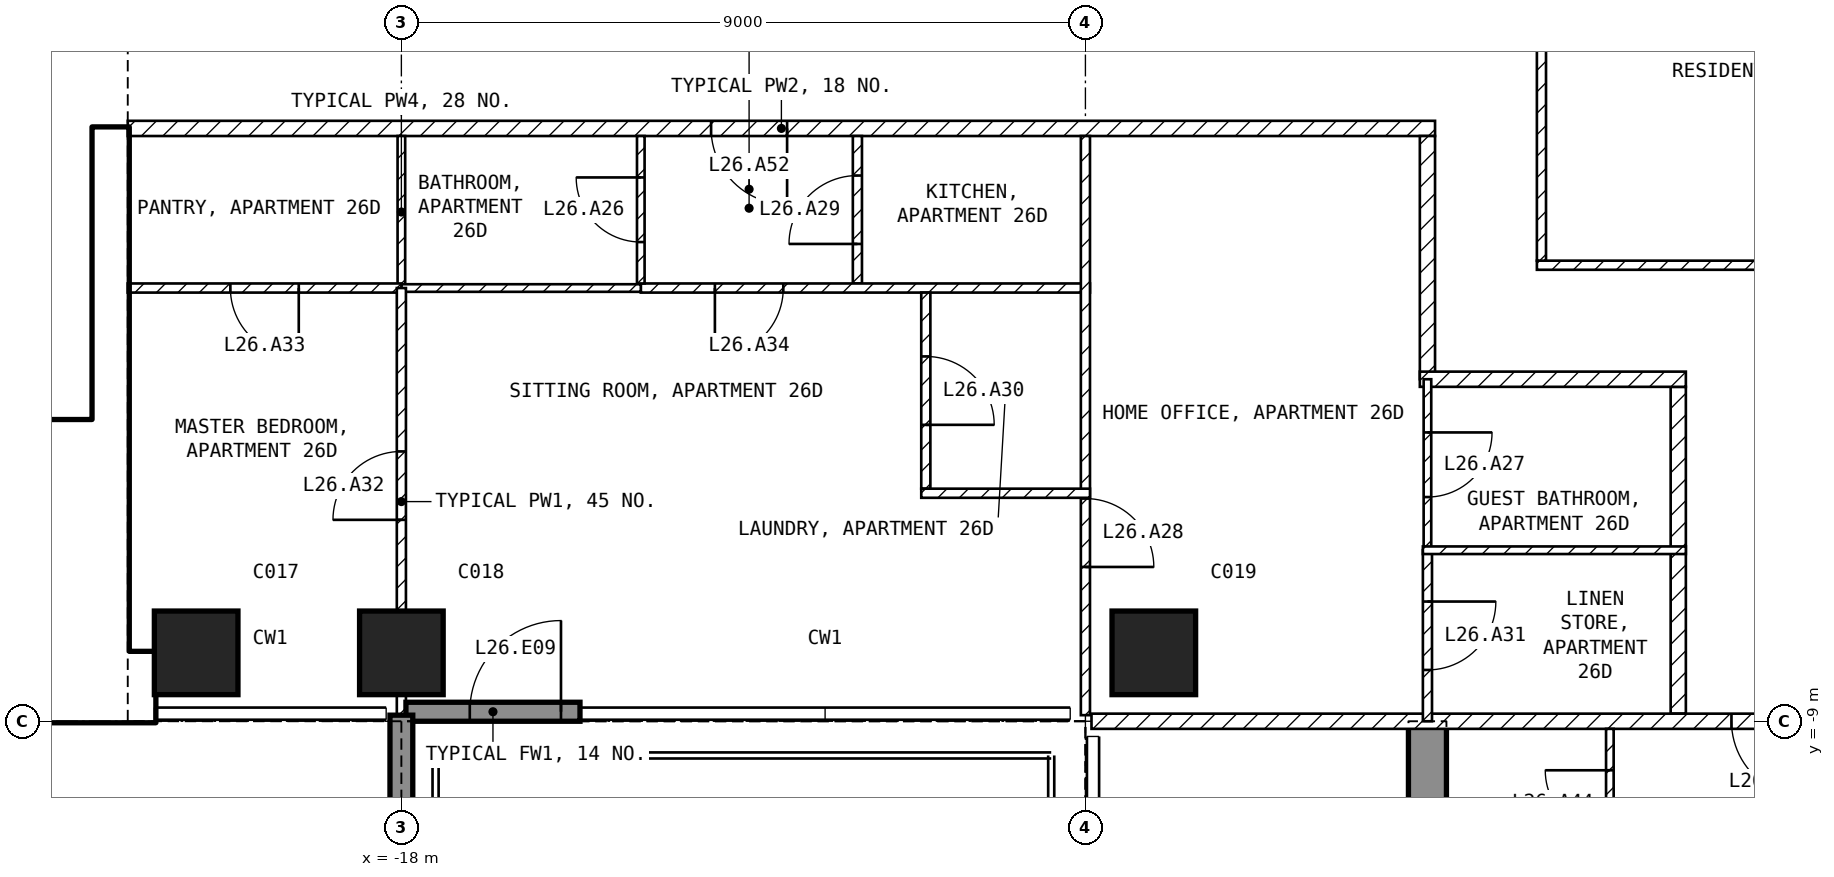
"""IFC4 building model, lengths in metres.
Left out: names, types, materials, properties, quantities, classifications, styles, units other than length and angle.
Written with IfcOpenShell. Run it as: python <this file> out.ifc"""

import sys

from ifc_helpers import new_model, si_unit, direction, frame, frame_2d, origin, origin_2d, place, context, subcontext, project, spatial, polyline, rectangle, outline, extrude, element, fill, save


model = new_model("IFC4")
c1 = context("Model", 3, precision=1e-05, world=origin(), true_north=direction((0.0, 1.0)))
c2 = subcontext(c1, "Body", "Model", "MODEL_VIEW")
j1 = project(units=[si_unit("LENGTHUNIT", "METRE"), si_unit("PLANEANGLEUNIT", "RADIAN")], contexts=[c1])
p1 = place(None, origin())
s1 = spatial("IfcSite", under=j1, at=p1, CompositionType="ELEMENT")
p2 = place(p1, origin())
s2 = spatial("IfcBuilding", under=s1, at=p2, CompositionType="ELEMENT")
p3 = place(p2, frame((0.0, 0.0, 112.9)))
s3 = spatial("IfcBuildingStorey", under=s2, at=p3, CompositionType="ELEMENT", Elevation=112.9)
for number, where, z_axis, x_axis in (
    (1, (-20.7, -8.1, -0.25), (0.0, 0.0, 1.0), (1.0, 0.0, 0.0)),
    (2, (-18.0, -8.1, -0.25), (0.0, 0.0, 1.0), (1.0, 0.0, 0.0)),
    (3, (-8.1, -8.1, -0.25), (0.0, 0.0, 1.0), (1.0, 0.0, 0.0)),
):
    element("IfcColumn", number, at=place(p3, frame(where, z_axis=z_axis, x_axis=x_axis)), inside=s3, PredefinedType="COLUMN", context=c2, shape_type="SweptSolid", body=[
        extrude(rectangle(XDim=1.1, YDim=1.1, at=origin_2d()), origin(), (0.0, 0.0, 1.0), 3.5),
    ])
p4 = place(p3, frame((-4.75, -20.15, -0.25), z_axis=(1.0, 0.0, 0.0), x_axis=(0.0, 1.0, 0.0)))
e4 = element("IfcWall", 4, at=p4, inside=s3, PredefinedType="SHEAR", context=c2, shape_type="SweptSolid", body=[
    extrude(outline(polyline([(0.0, 0.0), (6.65, 0.0), (6.65, 2.65), (9.05, 2.65), (9.05, 0.0), (11.15, 0.0), (11.15, 3.5), (0.0, 3.5), (0.0, 0.0)])), origin(), (0.0, 0.0, 1.0), 0.5),
])
p5 = place(p3, frame((-17.94, -8.875, 0.0), z_axis=(0.0, 0.0, 1.0), x_axis=(1.0, 0.0, 0.0)))
e5 = element("IfcWall", 5, at=p5, inside=s3, PredefinedType="SOLIDWALL", context=c2, shape_type="SweptSolid", body=[
    extrude(rectangle(XDim=2.29, YDim=0.25, at=frame_2d((1.145, 0.0))), origin(), (0.0, 0.0, 1.0), 3.25),
])
p6 = place(p5, frame((0.84, 0.0, 0.0)))
e6 = element("IfcOpeningElement", 6, at=p6, cuts=e5, PredefinedType="OPENING", context=c2, shape_type="SweptSolid", body=[
    extrude(rectangle(XDim=1.2, YDim=2.4, at=frame_2d((0.6, 1.2))), frame((0.0, 0.135, 0.0), z_axis=(0.0, -1.0, 0.0), x_axis=(1.0, 0.0, 0.0)), (0.0, 0.0, 1.0), 0.27),
])
p7 = place(p3, frame((-18.0, -8.92, 0.0), z_axis=(0.0, 0.0, 1.0), x_axis=(0.0, -1.0, 0.0)))
e7 = element("IfcWall", 7, at=p7, inside=s3, PredefinedType="SOLIDWALL", context=c2, shape_type="SweptSolid", body=[
    extrude(rectangle(XDim=2.82, YDim=0.3, at=frame_2d((1.41, 0.0))), origin(), (0.0, 0.0, 1.0), 3.25),
])
p8 = place(p3, frame((-30.2, -8.55, 0.0), z_axis=(0.0, 0.0, 1.0), x_axis=(1.0, 0.0, 0.0)))
e8 = element("IfcWall", 8, at=p8, inside=s3, PredefinedType="SHEAR", context=c2, shape_type="SweptSolid", body=[
    extrude(rectangle(XDim=8.95, YDim=0.9, at=frame_2d((4.475, 0.0))), origin(), (0.0, 0.0, 1.0), 3.25),
])
p9 = place(p3, frame((-21.825, -8.1, 0.0), z_axis=(0.0, 0.0, 1.0), x_axis=(0.0, 1.0, 0.0)))
e9 = element("IfcWall", 9, at=p9, inside=s3, PredefinedType="SHEAR", context=c2, shape_type="SweptSolid", body=[
    extrude(rectangle(XDim=6.9, YDim=0.45, at=frame_2d((3.45, 0.0))), origin(), (0.0, 0.0, 1.0), 3.25),
])
p10 = place(p3, frame((-28.35, -5.15, 0.0), z_axis=(0.0, 0.0, 1.0), x_axis=(1.0, 0.0, 0.0)))
e10 = element("IfcWall", 10, at=p10, inside=s3, PredefinedType="SOLIDWALL", context=c2, shape_type="SweptSolid", body=[
    extrude(rectangle(XDim=6.3, YDim=0.2, at=frame_2d((3.15, 0.0))), origin(), (0.0, 0.0, 1.0), 3.25),
])
p11 = place(p10, frame((5.1, 0.0, 0.0)))
e11 = element("IfcOpeningElement", 11, at=p11, cuts=e10, PredefinedType="OPENING", context=c2, shape_type="SweptSolid", body=[
    extrude(rectangle(XDim=1.0, YDim=2.1, at=frame_2d((0.5, 1.05))), frame((0.0, 0.11, 0.0), z_axis=(0.0, -1.0, 0.0), x_axis=(1.0, 0.0, 0.0)), (0.0, 0.0, 1.0), 0.22),
])
p12 = place(p3, frame((-3.06, -3.0, 0.0), z_axis=(0.0, 0.0, 1.0), x_axis=(1.0, 0.0, 0.0)))
e12 = element("IfcWall", 12, at=p12, inside=s3, PredefinedType="PARTITIONING", context=c2, shape_type="SweptSolid", body=[
    extrude(rectangle(XDim=6.12, YDim=0.12, at=frame_2d((3.06, 0.0))), origin(), (0.0, 0.0, 1.0), 3.25),
])
p13 = place(p3, frame((-3.0, 2.94, 0.0), z_axis=(0.0, 0.0, 1.0), x_axis=(0.0, -1.0, 0.0)))
e13 = element("IfcWall", 13, at=p13, inside=s3, PredefinedType="PARTITIONING", context=c2, shape_type="SweptSolid", body=[
    extrude(rectangle(XDim=5.88, YDim=0.12, at=frame_2d((2.94, 0.0))), origin(), (0.0, 0.0, 1.0), 3.25),
])
p14 = place(p3, frame((-4.4, -1.2, 0.0), z_axis=(0.0, 0.0, 1.0), x_axis=(-1.0, 0.0, 0.0)))
e14 = element("IfcWall", 14, at=p14, inside=s3, PredefinedType="PARTITIONING", context=c2, shape_type="SweptSolid", body=[
    extrude(rectangle(XDim=17.2, YDim=0.2, at=frame_2d((8.6, 0.0))), origin(), (0.0, 0.0, 1.0), 3.25),
])
p15 = place(p14, frame((8.525, 0.0, 0.0)))
e15 = element("IfcOpeningElement", 15, at=p15, cuts=e14, PredefinedType="OPENING", context=c2, shape_type="SweptSolid", body=[
    extrude(rectangle(XDim=1.0, YDim=2.1, at=frame_2d((0.5, 1.05))), frame((0.0, 0.11, 0.0), z_axis=(0.0, -1.0, 0.0), x_axis=(1.0, 0.0, 0.0)), (0.0, 0.0, 1.0), 0.22),
])
p16 = place(p3, frame((-4.5, -4.5, 0.0), z_axis=(0.0, 0.0, 1.0), x_axis=(0.0, 1.0, 0.0)))
e16 = element("IfcWall", 16, at=p16, inside=s3, PredefinedType="PARTITIONING", context=c2, shape_type="SweptSolid", body=[
    extrude(rectangle(XDim=3.2, YDim=0.2, at=frame_2d((1.6, 0.0))), origin(), (0.0, 0.0, 1.0), 3.25),
])
p17 = place(p3, frame((-1.2, -8.9, 0.0), z_axis=(0.0, 0.0, 1.0), x_axis=(0.0, 1.0, 0.0)))
e17 = element("IfcWall", 17, at=p17, inside=s3, PredefinedType="PARTITIONING", context=c2, shape_type="SweptSolid", body=[
    extrude(rectangle(XDim=4.3, YDim=0.2, at=frame_2d((2.15, 0.0))), origin(), (0.0, 0.0, 1.0), 3.25),
])
p18 = place(p3, frame((-1.1, -4.5, 0.0), z_axis=(0.0, 0.0, 1.0), x_axis=(-1.0, 0.0, 0.0)))
e18 = element("IfcWall", 18, at=p18, inside=s3, PredefinedType="PARTITIONING", context=c2, shape_type="SweptSolid", body=[
    extrude(rectangle(XDim=3.5, YDim=0.2, at=frame_2d((1.75, 0.0))), origin(), (0.0, 0.0, 1.0), 3.25),
])
p19 = place(p3, frame((8.92, -9.0, 0.0), z_axis=(0.0, 0.0, 1.0), x_axis=(-1.0, 0.0, 0.0)))
e19 = element("IfcWall", 19, at=p19, inside=s3, PredefinedType="PARTITIONING", context=c2, shape_type="SweptSolid", body=[
    extrude(rectangle(XDim=17.84, YDim=0.2, at=frame_2d((8.92, 0.0))), origin(), (0.0, 0.0, 1.0), 3.25),
])
p20 = place(p19, frame((8.42, 0.0, 0.0)))
e20 = element("IfcOpeningElement", 20, at=p20, cuts=e19, PredefinedType="OPENING", context=c2, shape_type="SweptSolid", body=[
    extrude(rectangle(XDim=1.0, YDim=2.1, at=frame_2d((0.5, 1.05))), frame((0.0, 0.11, 0.0), z_axis=(0.0, -1.0, 0.0), x_axis=(1.0, 0.0, 0.0)), (0.0, 0.0, 1.0), 0.22),
])
p21 = place(p3, frame((-12.0, -3.24, 0.0), z_axis=(0.0, 0.0, 1.0), x_axis=(0.0, 1.0, 0.0)))
e21 = element("IfcWall", 21, at=p21, inside=s3, PredefinedType="PARTITIONING", context=c2, shape_type="SweptSolid", body=[
    extrude(rectangle(XDim=1.94, YDim=0.12, at=frame_2d((0.97, 0.0))), origin(), (0.0, 0.0, 1.0), 3.25),
])
p22 = place(p21, frame((0.52, 0.0, 0.0)))
e22 = element("IfcOpeningElement", 22, at=p22, cuts=e21, PredefinedType="OPENING", context=c2, shape_type="SweptSolid", body=[
    extrude(rectangle(XDim=0.9, YDim=2.1, at=frame_2d((0.45, 1.05))), frame((0.0, 0.07, 0.0), z_axis=(0.0, -1.0, 0.0), x_axis=(1.0, 0.0, 0.0)), (0.0, 0.0, 1.0), 0.14),
])
p23 = place(p3, frame((-8.94, -3.3, 0.0), z_axis=(0.0, 0.0, 1.0), x_axis=(-1.0, 0.0, 0.0)))
e23 = element("IfcWall", 23, at=p23, inside=s3, PredefinedType="PARTITIONING", context=c2, shape_type="SweptSolid", body=[
    extrude(rectangle(XDim=5.91, YDim=0.12, at=frame_2d((2.955, 0.0))), origin(), (0.0, 0.0, 1.0), 3.25),
])
p24 = place(p23, frame((4.035, 0.0, 0.0)))
e24 = element("IfcOpeningElement", 24, at=p24, cuts=e23, PredefinedType="OPENING", context=c2, shape_type="SweptSolid", body=[
    extrude(rectangle(XDim=0.9, YDim=2.1, at=frame_2d((0.45, 1.05))), frame((0.0, 0.07, 0.0), z_axis=(0.0, -1.0, 0.0), x_axis=(1.0, 0.0, 0.0)), (0.0, 0.0, 1.0), 0.14),
])
p25 = place(p3, frame((-9.0, -1.3, 0.0), z_axis=(0.0, 0.0, 1.0), x_axis=(0.0, -1.0, 0.0)))
e25 = element("IfcWall", 25, at=p25, inside=s3, PredefinedType="PARTITIONING", context=c2, shape_type="SweptSolid", body=[
    extrude(rectangle(XDim=7.62, YDim=0.12, at=frame_2d((3.81, 0.0))), origin(), (0.0, 0.0, 1.0), 3.25),
])
p26 = place(p25, frame((4.77, 0.0, 0.0)))
e26 = element("IfcOpeningElement", 26, at=p26, cuts=e25, PredefinedType="OPENING", context=c2, shape_type="SweptSolid", body=[
    extrude(rectangle(XDim=0.9, YDim=2.1, at=frame_2d((0.45, 1.05))), frame((0.0, 0.07, 0.0), z_axis=(0.0, -1.0, 0.0), x_axis=(1.0, 0.0, 0.0)), (0.0, 0.0, 1.0), 0.14),
])
p27 = place(p3, frame((-14.85, -3.24, 0.0), z_axis=(0.0, 0.0, 1.0), x_axis=(0.0, 1.0, 0.0)))
e27 = element("IfcWall", 27, at=p27, inside=s3, PredefinedType="PARTITIONING", context=c2, shape_type="SweptSolid", body=[
    extrude(rectangle(XDim=1.94, YDim=0.1, at=frame_2d((0.97, 0.0))), origin(), (0.0, 0.0, 1.0), 3.25),
])
p28 = place(p27, frame((0.545, 0.0, 0.0)))
e28 = element("IfcOpeningElement", 28, at=p28, cuts=e27, PredefinedType="OPENING", context=c2, shape_type="SweptSolid", body=[
    extrude(rectangle(XDim=0.85, YDim=2.1, at=frame_2d((0.425, 1.05))), frame((0.0, 0.06, 0.0), z_axis=(0.0, -1.0, 0.0), x_axis=(1.0, 0.0, 0.0)), (0.0, 0.0, 1.0), 0.12),
])
p29 = place(p3, frame((-18.0, -3.3, 0.0), z_axis=(0.0, 0.0, 1.0), x_axis=(0.0, 1.0, 0.0)))
e29 = element("IfcWall", 29, at=p29, inside=s3, PredefinedType="PARTITIONING", context=c2, shape_type="SweptSolid", body=[
    extrude(rectangle(XDim=2.0, YDim=0.1, at=frame_2d((1.0, 0.0))), origin(), (0.0, 0.0, 1.0), 2.414),
])
p30 = place(p3, frame((-14.85, -3.3, 0.0), z_axis=(0.0, 0.0, 1.0), x_axis=(-1.0, 0.0, 0.0)))
e30 = element("IfcWall", 30, at=p30, inside=s3, PredefinedType="PARTITIONING", context=c2, shape_type="SweptSolid", body=[
    extrude(rectangle(XDim=3.15, YDim=0.1, at=frame_2d((1.575, 0.0))), origin(), (0.0, 0.0, 1.0), 3.25),
])
p31 = place(p3, frame((-18.0, -3.3, 0.0), z_axis=(0.0, 0.0, 1.0), x_axis=(-1.0, 0.0, 0.0)))
e31 = element("IfcWall", 31, at=p31, inside=s3, PredefinedType="PARTITIONING", context=c2, shape_type="SweptSolid", body=[
    extrude(rectangle(XDim=3.6, YDim=0.12, at=frame_2d((1.8, 0.0))), origin(), (0.0, 0.0, 1.0), 3.25),
])
p32 = place(p31, frame((1.35, 0.0, 0.0)))
e32 = element("IfcOpeningElement", 32, at=p32, cuts=e31, PredefinedType="OPENING", context=c2, shape_type="SweptSolid", body=[
    extrude(rectangle(XDim=0.9, YDim=2.1, at=frame_2d((0.45, 1.05))), frame((0.0, 0.07, 0.0), z_axis=(0.0, -1.0, 0.0), x_axis=(1.0, 0.0, 0.0)), (0.0, 0.0, 1.0), 0.14),
])
p33 = place(p3, frame((-11.1, -3.36, 0.0), z_axis=(0.0, 0.0, 1.0), x_axis=(0.0, -1.0, 0.0)))
e33 = element("IfcWall", 33, at=p33, inside=s3, PredefinedType="PARTITIONING", context=c2, shape_type="SweptSolid", body=[
    extrude(rectangle(XDim=2.58, YDim=0.12, at=frame_2d((1.29, 0.0))), origin(), (0.0, 0.0, 1.0), 3.25),
])
p34 = place(p33, frame((0.84, 0.0, 0.0)))
e34 = element("IfcOpeningElement", 34, at=p34, cuts=e33, PredefinedType="OPENING", context=c2, shape_type="SweptSolid", body=[
    extrude(rectangle(XDim=0.9, YDim=2.1, at=frame_2d((0.45, 1.05))), frame((0.0, 0.07, 0.0), z_axis=(0.0, -1.0, 0.0), x_axis=(1.0, 0.0, 0.0)), (0.0, 0.0, 1.0), 0.14),
])
p35 = place(p3, frame((-11.16, -6.0, 0.0), z_axis=(0.0, 0.0, 1.0), x_axis=(1.0, 0.0, 0.0)))
e35 = element("IfcWall", 35, at=p35, inside=s3, PredefinedType="PARTITIONING", context=c2, shape_type="SweptSolid", body=[
    extrude(rectangle(XDim=2.22, YDim=0.12, at=frame_2d((1.11, 0.0))), origin(), (0.0, 0.0, 1.0), 3.25),
])
p36 = place(p3, frame((-18.0, -8.92, 0.0), z_axis=(0.0, 0.0, 1.0), x_axis=(0.0, 1.0, 0.0)))
e36 = element("IfcWall", 36, at=p36, inside=s3, PredefinedType="PARTITIONING", context=c2, shape_type="SweptSolid", body=[
    extrude(rectangle(XDim=5.62, YDim=0.12, at=frame_2d((2.81, 0.0))), origin(), (0.0, 0.0, 1.0), 2.414),
])
p37 = place(p36, frame((2.57, 0.0, 0.0)))
e37 = element("IfcOpeningElement", 37, at=p37, cuts=e36, PredefinedType="OPENING", context=c2, shape_type="SweptSolid", body=[
    extrude(rectangle(XDim=0.9, YDim=2.1, at=frame_2d((0.45, 1.05))), frame((0.0, 0.07, 0.0), z_axis=(0.0, -1.0, 0.0), x_axis=(1.0, 0.0, 0.0)), (0.0, 0.0, 1.0), 0.14),
])
p38 = place(p3, frame((-4.5, -4.5, 0.0), z_axis=(0.0, 0.0, 1.0), x_axis=(0.0, -1.0, 0.0)))
e38 = element("IfcWall", 38, at=p38, inside=s3, PredefinedType="PARTITIONING", context=c2, shape_type="SweptSolid", body=[
    extrude(rectangle(XDim=2.25, YDim=0.1, at=frame_2d((1.125, 0.0))), origin(), (0.0, 0.0, 1.0), 3.25),
])
p39 = place(p38, frame((0.7, 0.0, 0.0)))
e39 = element("IfcOpeningElement", 39, at=p39, cuts=e38, PredefinedType="OPENING", context=c2, shape_type="SweptSolid", body=[
    extrude(rectangle(XDim=0.85, YDim=2.1, at=frame_2d((0.425, 1.05))), frame((0.0, 0.06, 0.0), z_axis=(0.0, -1.0, 0.0), x_axis=(1.0, 0.0, 0.0)), (0.0, 0.0, 1.0), 0.12),
])
p40 = place(p3, frame((-4.5, -6.75, 0.0), z_axis=(0.0, 0.0, 1.0), x_axis=(0.0, -1.0, 0.0)))
e40 = element("IfcWall", 40, at=p40, inside=s3, PredefinedType="PARTITIONING", context=c2, shape_type="SweptSolid", body=[
    extrude(rectangle(XDim=2.25, YDim=0.12, at=frame_2d((1.125, 0.0))), origin(), (0.0, 0.0, 1.0), 3.25),
])
p41 = place(p40, frame((0.675, 0.0, 0.0)))
e41 = element("IfcOpeningElement", 41, at=p41, cuts=e40, PredefinedType="OPENING", context=c2, shape_type="SweptSolid", body=[
    extrude(rectangle(XDim=0.9, YDim=2.1, at=frame_2d((0.45, 1.05))), frame((0.0, 0.07, 0.0), z_axis=(0.0, -1.0, 0.0), x_axis=(1.0, 0.0, 0.0)), (0.0, 0.0, 1.0), 0.14),
])
p42 = place(p3, frame((-1.1, -6.75, 0.0), z_axis=(0.0, 0.0, 1.0), x_axis=(-1.0, 0.0, 0.0)))
e42 = element("IfcWall", 42, at=p42, inside=s3, PredefinedType="PARTITIONING", context=c2, shape_type="SweptSolid", body=[
    extrude(rectangle(XDim=3.46, YDim=0.1, at=frame_2d((1.73, 0.0))), origin(), (0.0, 0.0, 1.0), 3.25),
])
p43 = place(p3, frame((-2.1, -11.04, 0.0), z_axis=(0.0, 0.0, 1.0), x_axis=(0.0, 1.0, 0.0)))
e43 = element("IfcWall", 43, at=p43, inside=s3, PredefinedType="PARTITIONING", context=c2, shape_type="SweptSolid", body=[
    extrude(rectangle(XDim=1.94, YDim=0.1, at=frame_2d((0.97, 0.0))), origin(), (0.0, 0.0, 1.0), 3.25),
])
p44 = place(p43, frame((0.545, 0.0, 0.0)))
e44 = element("IfcOpeningElement", 44, at=p44, cuts=e43, PredefinedType="OPENING", context=c2, shape_type="SweptSolid", body=[
    extrude(rectangle(XDim=0.85, YDim=2.1, at=frame_2d((0.425, 1.05))), frame((0.0, 0.06, 0.0), z_axis=(0.0, -1.0, 0.0), x_axis=(1.0, 0.0, 0.0)), (0.0, 0.0, 1.0), 0.12),
])
p45 = place(p6, origin())
e45 = element("IfcDoor", 45, at=p45, inside=s3, OperationType="SINGLE_SWING_RIGHT", PredefinedType="DOOR", context=c2, shape_type="SweptSolid", body=[
    extrude(rectangle(XDim=1.2, YDim=2.4, at=frame_2d((0.6, 1.2))), frame((0.0, 0.025, 0.0), z_axis=(0.0, -1.0, 0.0), x_axis=(1.0, 0.0, 0.0)), (0.0, 0.0, 1.0), 0.05),
])
fill(e6, e45)
p46 = place(p11, origin())
e46 = element("IfcDoor", 46, at=p46, inside=s3, OperationType="SINGLE_SWING_LEFT", PredefinedType="DOOR", context=c2, shape_type="SweptSolid", body=[
    extrude(rectangle(XDim=1.0, YDim=2.1, at=frame_2d((0.5, 1.05))), frame((0.0, 0.025, 0.0), z_axis=(0.0, -1.0, 0.0), x_axis=(1.0, 0.0, 0.0)), (0.0, 0.0, 1.0), 0.05),
])
fill(e11, e46)
p47 = place(p28, origin())
e47 = element("IfcDoor", 47, at=p47, inside=s3, OperationType="SINGLE_SWING_RIGHT", PredefinedType="DOOR", context=c2, shape_type="SweptSolid", body=[
    extrude(rectangle(XDim=0.85, YDim=2.1, at=frame_2d((0.425, 1.05))), frame((0.0, 0.025, 0.0), z_axis=(0.0, -1.0, 0.0), x_axis=(1.0, 0.0, 0.0)), (0.0, 0.0, 1.0), 0.05),
])
fill(e28, e47)
p48 = place(p39, origin())
e48 = element("IfcDoor", 48, at=p48, inside=s3, OperationType="SINGLE_SWING_LEFT", PredefinedType="DOOR", context=c2, shape_type="SweptSolid", body=[
    extrude(rectangle(XDim=0.85, YDim=2.1, at=frame_2d((0.425, 1.05))), frame((0.0, 0.025, 0.0), z_axis=(0.0, -1.0, 0.0), x_axis=(1.0, 0.0, 0.0)), (0.0, 0.0, 1.0), 0.05),
])
fill(e39, e48)
p49 = place(p26, origin())
e49 = element("IfcDoor", 49, at=p49, inside=s3, OperationType="SINGLE_SWING_RIGHT", PredefinedType="DOOR", context=c2, shape_type="SweptSolid", body=[
    extrude(rectangle(XDim=0.9, YDim=2.1, at=frame_2d((0.45, 1.05))), frame((0.0, 0.025, 0.0), z_axis=(0.0, -1.0, 0.0), x_axis=(1.0, 0.0, 0.0)), (0.0, 0.0, 1.0), 0.05),
])
fill(e26, e49)
p50 = place(p22, origin())
e50 = element("IfcDoor", 50, at=p50, inside=s3, OperationType="SINGLE_SWING_LEFT", PredefinedType="DOOR", context=c2, shape_type="SweptSolid", body=[
    extrude(rectangle(XDim=0.9, YDim=2.1, at=frame_2d((0.45, 1.05))), frame((0.0, 0.025, 0.0), z_axis=(0.0, -1.0, 0.0), x_axis=(1.0, 0.0, 0.0)), (0.0, 0.0, 1.0), 0.05),
])
fill(e22, e50)
p51 = place(p34, origin())
e51 = element("IfcDoor", 51, at=p51, inside=s3, OperationType="SINGLE_SWING_RIGHT", PredefinedType="DOOR", context=c2, shape_type="SweptSolid", body=[
    extrude(rectangle(XDim=0.9, YDim=2.1, at=frame_2d((0.45, 1.05))), frame((0.0, 0.025, 0.0), z_axis=(0.0, -1.0, 0.0), x_axis=(1.0, 0.0, 0.0)), (0.0, 0.0, 1.0), 0.05),
])
fill(e34, e51)
p52 = place(p41, origin())
e52 = element("IfcDoor", 52, at=p52, inside=s3, OperationType="SINGLE_SWING_LEFT", PredefinedType="DOOR", context=c2, shape_type="SweptSolid", body=[
    extrude(rectangle(XDim=0.9, YDim=2.1, at=frame_2d((0.45, 1.05))), frame((0.0, 0.025, 0.0), z_axis=(0.0, -1.0, 0.0), x_axis=(1.0, 0.0, 0.0)), (0.0, 0.0, 1.0), 0.05),
])
fill(e41, e52)
p53 = place(p37, origin())
e53 = element("IfcDoor", 53, at=p53, inside=s3, OperationType="SINGLE_SWING_LEFT", PredefinedType="DOOR", context=c2, shape_type="SweptSolid", body=[
    extrude(rectangle(XDim=0.9, YDim=2.1, at=frame_2d((0.45, 1.05))), frame((0.0, 0.025, 0.0), z_axis=(0.0, -1.0, 0.0), x_axis=(1.0, 0.0, 0.0)), (0.0, 0.0, 1.0), 0.05),
])
fill(e37, e53)
p54 = place(p32, origin())
e54 = element("IfcDoor", 54, at=p54, inside=s3, OperationType="SINGLE_SWING_LEFT", PredefinedType="DOOR", context=c2, shape_type="SweptSolid", body=[
    extrude(rectangle(XDim=0.9, YDim=2.1, at=frame_2d((0.45, 1.05))), frame((0.0, 0.025, 0.0), z_axis=(0.0, -1.0, 0.0), x_axis=(1.0, 0.0, 0.0)), (0.0, 0.0, 1.0), 0.05),
])
fill(e32, e54)
p55 = place(p24, origin())
e55 = element("IfcDoor", 55, at=p55, inside=s3, OperationType="SINGLE_SWING_RIGHT", PredefinedType="DOOR", context=c2, shape_type="SweptSolid", body=[
    extrude(rectangle(XDim=0.9, YDim=2.1, at=frame_2d((0.45, 1.05))), frame((0.0, 0.025, 0.0), z_axis=(0.0, -1.0, 0.0), x_axis=(1.0, 0.0, 0.0)), (0.0, 0.0, 1.0), 0.05),
])
fill(e24, e55)
p56 = place(p20, origin())
e56 = element("IfcDoor", 56, at=p56, inside=s3, OperationType="SINGLE_SWING_LEFT", PredefinedType="DOOR", context=c2, shape_type="SweptSolid", body=[
    extrude(rectangle(XDim=1.0, YDim=2.1, at=frame_2d((0.5, 1.05))), frame((0.0, 0.025, 0.0), z_axis=(0.0, -1.0, 0.0), x_axis=(1.0, 0.0, 0.0)), (0.0, 0.0, 1.0), 0.05),
])
fill(e20, e56)
p57 = place(p44, origin())
e57 = element("IfcDoor", 57, at=p57, inside=s3, OperationType="SINGLE_SWING_RIGHT", PredefinedType="DOOR", context=c2, shape_type="SweptSolid", body=[
    extrude(rectangle(XDim=0.85, YDim=2.1, at=frame_2d((0.425, 1.05))), frame((0.0, 0.025, 0.0), z_axis=(0.0, -1.0, 0.0), x_axis=(1.0, 0.0, 0.0)), (0.0, 0.0, 1.0), 0.05),
])
fill(e44, e57)
p58 = place(p15, origin())
e58 = element("IfcDoor", 58, at=p58, inside=s3, OperationType="SINGLE_SWING_LEFT", PredefinedType="DOOR", context=c2, shape_type="SweptSolid", body=[
    extrude(rectangle(XDim=1.0, YDim=2.1, at=frame_2d((0.5, 1.05))), frame((0.0, 0.025, 0.0), z_axis=(0.0, -1.0, 0.0), x_axis=(1.0, 0.0, 0.0)), (0.0, 0.0, 1.0), 0.05),
])
fill(e15, e58)
save(model, sys.argv[1])
